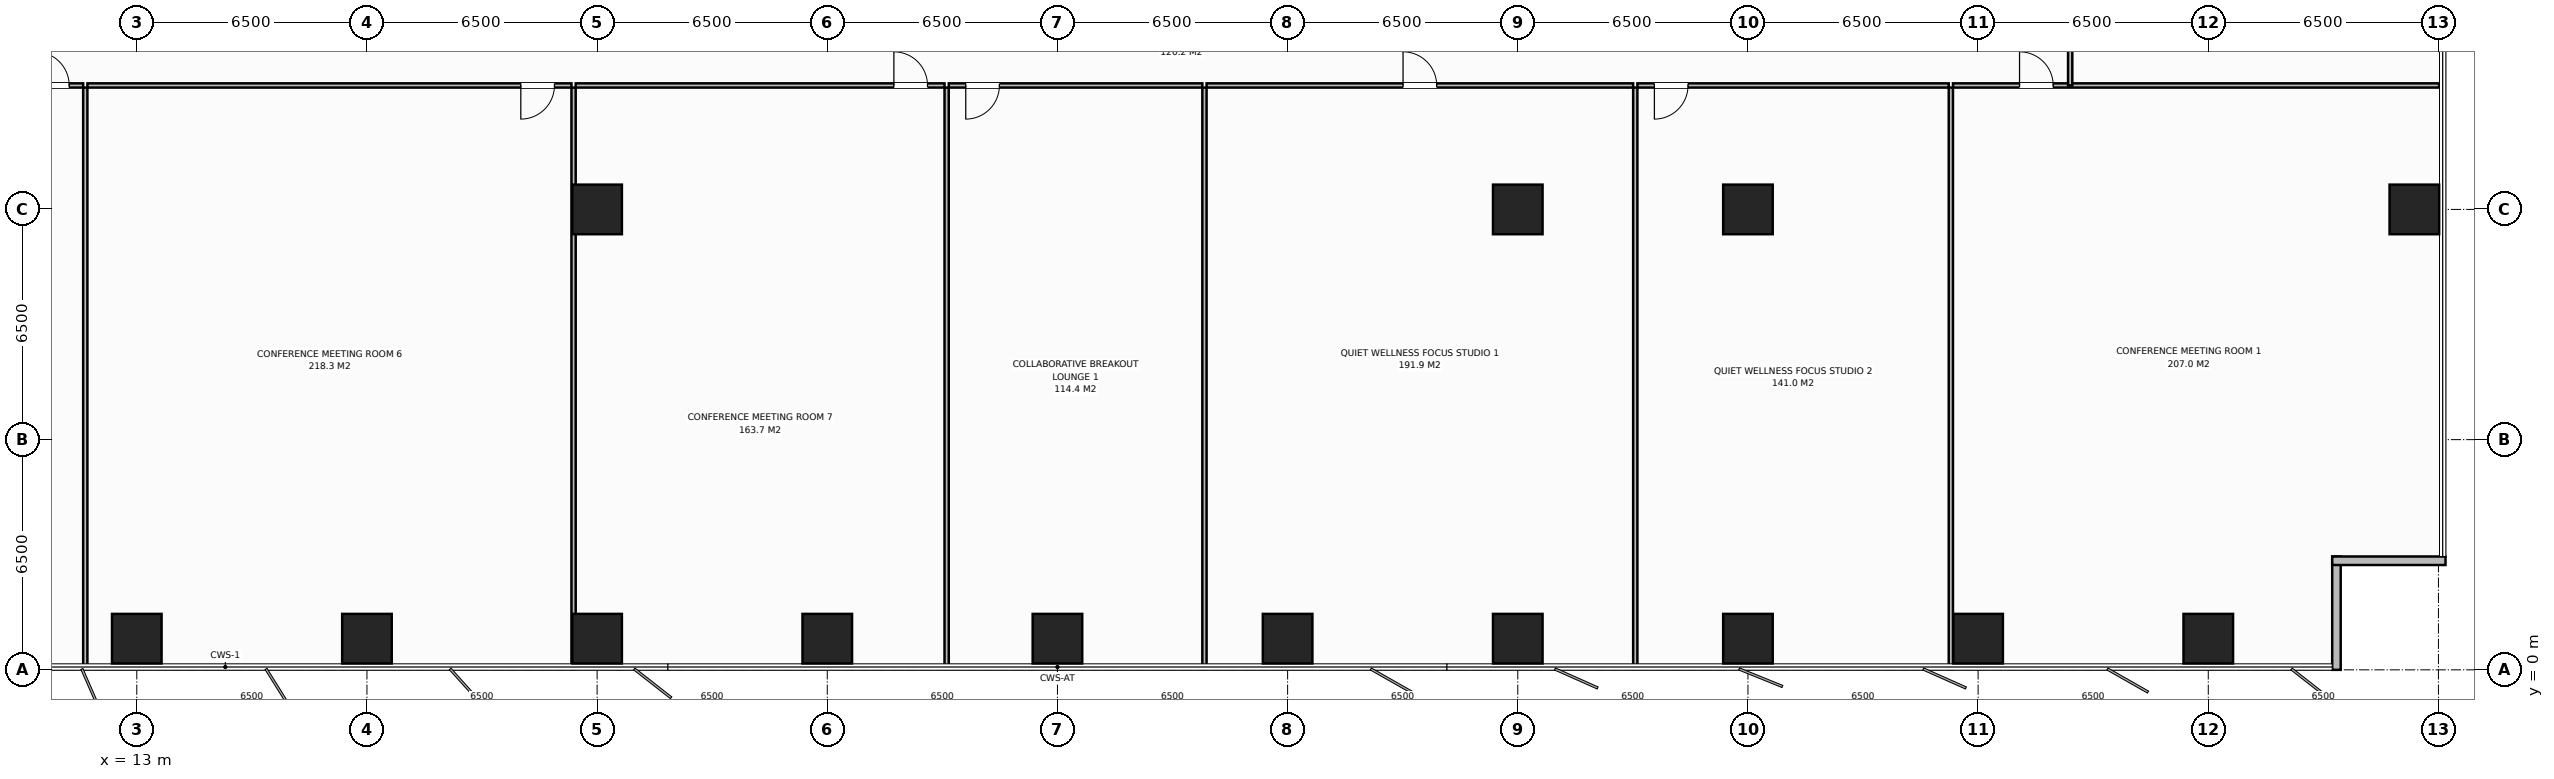
"""IFC4 building model, lengths in metres.
Left out: names, types, materials, properties, quantities, classifications, styles, units other than length and angle.
Written with IfcOpenShell. Run it as: python <this file> out.ifc"""

import sys

from ifc_helpers import new_model, si_unit, direction, frame, frame_2d, origin, origin_2d, place, context, subcontext, project, spatial, rectangle, extrude, element, fill, save


model = new_model("IFC4")
c1 = context("Model", 3, precision=1e-05, world=origin(), true_north=direction((0.0, 1.0)))
c2 = subcontext(c1, "Body", "Model", "MODEL_VIEW")
j1 = project(units=[si_unit("LENGTHUNIT", "METRE"), si_unit("PLANEANGLEUNIT", "RADIAN")], contexts=[c1])
p1 = place(None, origin())
s1 = spatial("IfcSite", under=j1, at=p1, CompositionType="ELEMENT")
p2 = place(p1, origin())
s2 = spatial("IfcBuilding", under=s1, at=p2, CompositionType="ELEMENT")
p3 = place(p2, frame((0.0, 0.0, 73.4)))
s3 = spatial("IfcBuildingStorey", under=s2, at=p3, CompositionType="ELEMENT", Elevation=73.4)
for number, where, z_axis, x_axis in (
    (1, (58.5, 13.0, 0.0), (0.0, 0.0, 1.0), (1.0, 0.0, 0.0)),
    (2, (26.0, 13.0, 0.0), (0.0, 0.0, 1.0), (1.0, 0.0, 0.0)),
    (3, (52.0, 13.0, 0.0), (0.0, 0.0, 1.0), (1.0, 0.0, 0.0)),
    (4, (13.0, 0.88, 0.0), (0.0, 0.0, 1.0), (1.0, 0.0, 0.0)),
    (5, (19.5, 0.88, 0.0), (0.0, 0.0, 1.0), (1.0, 0.0, 0.0)),
    (6, (26.0, 0.88, 0.0), (0.0, 0.0, 1.0), (1.0, 0.0, 0.0)),
    (7, (32.5, 0.88, 0.0), (0.0, 0.0, 1.0), (1.0, 0.0, 0.0)),
    (8, (39.0, 0.88, 0.0), (0.0, 0.0, 1.0), (1.0, 0.0, 0.0)),
    (9, (45.5, 0.88, 0.0), (0.0, 0.0, 1.0), (1.0, 0.0, 0.0)),
    (10, (52.0, 0.88, 0.0), (0.0, 0.0, 1.0), (1.0, 0.0, 0.0)),
    (11, (58.5, 0.88, 0.0), (0.0, 0.0, 1.0), (1.0, 0.0, 0.0)),
    (12, (65.0, 0.88, 0.0), (0.0, 0.0, 1.0), (1.0, 0.0, 0.0)),
    (13, (71.5, 0.88, 0.0), (0.0, 0.0, 1.0), (1.0, 0.0, 0.0)),
    (14, (77.32, 13.0, 0.0), (0.0, 0.0, 1.0), (1.0, 0.0, 0.0)),
):
    element("IfcColumn", number, at=place(p3, frame(where, z_axis=z_axis, x_axis=x_axis)), inside=s3, PredefinedType="COLUMN", context=c2, shape_type="SweptSolid", body=[
        extrude(rectangle(XDim=1.4, YDim=1.4, at=origin_2d()), origin(), (0.0, 0.0, 1.0), 3.8),
    ])
for number, where, z_axis, x_axis in (
    (15, (75.12, 3.2, 0.0), (0.0, 0.0, 1.0), (0.0, -1.0, 0.0)),
    (16, (78.2, 3.08, 0.0), (0.0, 0.0, 1.0), (-1.0, 0.0, 0.0)),
):
    element("IfcWall", number, at=place(p3, frame(where, z_axis=z_axis, x_axis=x_axis)), inside=s3, PredefinedType="STANDARD", context=c2, shape_type="SweptSolid", body=[
        extrude(rectangle(XDim=3.2, YDim=0.24, at=frame_2d((1.6, 0.0))), origin(), (0.0, 0.0, 1.0), 3.55),
    ])
p4 = place(p3, frame((11.545, 0.02, 0.0), z_axis=(0.0, 0.0, 1.0), x_axis=(0.0, 1.0, 0.0)))
e17 = element("IfcWall", 17, at=p4, inside=s3, PredefinedType="PARTITIONING", context=c2, shape_type="SweptSolid", body=[
    extrude(rectangle(XDim=16.42, YDim=0.12, at=frame_2d((8.21, 0.0))), origin(), (0.0, 0.0, 1.0), 3.55),
])
p5 = place(p3, frame((-0.02, 16.5, 0.0), z_axis=(0.0, 0.0, 1.0), x_axis=(1.0, 0.0, 0.0)))
e18 = element("IfcWall", 18, at=p5, inside=s3, PredefinedType="PARTITIONING", context=c2, shape_type="SweptSolid", body=[
    extrude(rectangle(XDim=11.506, YDim=0.12, at=frame_2d((5.753, 0.0))), origin(), (0.0, 0.0, 1.0), 3.55),
])
p6 = place(p5, frame((10.16, 0.0, 0.0)))
e19 = element("IfcOpeningElement", 19, at=p6, cuts=e18, PredefinedType="OPENING", context=c2, shape_type="SweptSolid", body=[
    extrude(rectangle(XDim=0.95, YDim=2.15, at=frame_2d((0.475, 1.075))), frame((0.0, 0.07, 0.0), z_axis=(0.0, -1.0, 0.0), x_axis=(1.0, 0.0, 0.0)), (0.0, 0.0, 1.0), 0.14),
])
p7 = place(p3, frame((25.335, 0.02, 0.0), z_axis=(0.0, 0.0, 1.0), x_axis=(0.0, 1.0, 0.0)))
e20 = element("IfcWall", 20, at=p7, inside=s3, PredefinedType="PARTITIONING", context=c2, shape_type="SweptSolid", body=[
    extrude(rectangle(XDim=16.42, YDim=0.12, at=frame_2d((8.21, 0.0))), origin(), (0.0, 0.0, 1.0), 3.55),
])
p8 = place(p3, frame((11.605, 16.5, 0.0), z_axis=(0.0, 0.0, 1.0), x_axis=(1.0, 0.0, 0.0)))
e21 = element("IfcWall", 21, at=p8, inside=s3, PredefinedType="PARTITIONING", context=c2, shape_type="SweptSolid", body=[
    extrude(rectangle(XDim=13.67, YDim=0.12, at=frame_2d((6.835, 0.0))), origin(), (0.0, 0.0, 1.0), 3.55),
])
p9 = place(p8, frame((12.24, 0.0, 0.0)))
e22 = element("IfcOpeningElement", 22, at=p9, cuts=e21, PredefinedType="OPENING", context=c2, shape_type="SweptSolid", body=[
    extrude(rectangle(XDim=0.95, YDim=2.15, at=frame_2d((0.475, 1.075))), frame((0.0, 0.07, 0.0), z_axis=(0.0, -1.0, 0.0), x_axis=(1.0, 0.0, 0.0)), (0.0, 0.0, 1.0), 0.14),
])
p10 = place(p3, frame((35.871, 0.02, 0.0), z_axis=(0.0, 0.0, 1.0), x_axis=(0.0, 1.0, 0.0)))
e23 = element("IfcWall", 23, at=p10, inside=s3, PredefinedType="PARTITIONING", context=c2, shape_type="SweptSolid", body=[
    extrude(rectangle(XDim=16.42, YDim=0.12, at=frame_2d((8.21, 0.0))), origin(), (0.0, 0.0, 1.0), 3.55),
])
p11 = place(p3, frame((25.395, 16.5, 0.0), z_axis=(0.0, 0.0, 1.0), x_axis=(1.0, 0.0, 0.0)))
e24 = element("IfcWall", 24, at=p11, inside=s3, PredefinedType="PARTITIONING", context=c2, shape_type="SweptSolid", body=[
    extrude(rectangle(XDim=10.415, YDim=0.12, at=frame_2d((5.208, 0.0))), origin(), (0.0, 0.0, 1.0), 3.55),
])
p12 = place(p11, frame((8.985, 0.0, 0.0)))
e25 = element("IfcOpeningElement", 25, at=p12, cuts=e24, PredefinedType="OPENING", context=c2, shape_type="SweptSolid", body=[
    extrude(rectangle(XDim=0.95, YDim=2.15, at=frame_2d((0.475, 1.075))), frame((0.0, 0.07, 0.0), z_axis=(0.0, -1.0, 0.0), x_axis=(1.0, 0.0, 0.0)), (0.0, 0.0, 1.0), 0.14),
])
p13 = place(p3, frame((43.152, 0.02, 0.0), z_axis=(0.0, 0.0, 1.0), x_axis=(0.0, 1.0, 0.0)))
e26 = element("IfcWall", 26, at=p13, inside=s3, PredefinedType="PARTITIONING", context=c2, shape_type="SweptSolid", body=[
    extrude(rectangle(XDim=16.42, YDim=0.12, at=frame_2d((8.21, 0.0))), origin(), (0.0, 0.0, 1.0), 3.55),
])
p14 = place(p3, frame((35.931, 16.5, 0.0), z_axis=(0.0, 0.0, 1.0), x_axis=(1.0, 0.0, 0.0)))
e27 = element("IfcWall", 27, at=p14, inside=s3, PredefinedType="PARTITIONING", context=c2, shape_type="SweptSolid", body=[
    extrude(rectangle(XDim=7.161, YDim=0.12, at=frame_2d((3.581, 0.0))), origin(), (0.0, 0.0, 1.0), 3.55),
])
p15 = place(p14, frame((0.48, 0.0, 0.0)))
e28 = element("IfcOpeningElement", 28, at=p15, cuts=e27, PredefinedType="OPENING", context=c2, shape_type="SweptSolid", body=[
    extrude(rectangle(XDim=0.95, YDim=2.15, at=frame_2d((0.475, 1.075))), frame((0.0, 0.07, 0.0), z_axis=(0.0, -1.0, 0.0), x_axis=(1.0, 0.0, 0.0)), (0.0, 0.0, 1.0), 0.14),
])
p16 = place(p3, frame((55.318, 0.02, 0.0), z_axis=(0.0, 0.0, 1.0), x_axis=(0.0, 1.0, 0.0)))
e29 = element("IfcWall", 29, at=p16, inside=s3, PredefinedType="PARTITIONING", context=c2, shape_type="SweptSolid", body=[
    extrude(rectangle(XDim=16.42, YDim=0.12, at=frame_2d((8.21, 0.0))), origin(), (0.0, 0.0, 1.0), 3.55),
])
p17 = place(p3, frame((43.212, 16.5, 0.0), z_axis=(0.0, 0.0, 1.0), x_axis=(1.0, 0.0, 0.0)))
e30 = element("IfcWall", 30, at=p17, inside=s3, PredefinedType="PARTITIONING", context=c2, shape_type="SweptSolid", body=[
    extrude(rectangle(XDim=12.047, YDim=0.12, at=frame_2d((6.023, 0.0))), origin(), (0.0, 0.0, 1.0), 3.55),
])
p18 = place(p17, frame((5.548, 0.0, 0.0)))
e31 = element("IfcOpeningElement", 31, at=p18, cuts=e30, PredefinedType="OPENING", context=c2, shape_type="SweptSolid", body=[
    extrude(rectangle(XDim=0.95, YDim=2.15, at=frame_2d((0.475, 1.075))), frame((0.0, 0.07, 0.0), z_axis=(0.0, -1.0, 0.0), x_axis=(1.0, 0.0, 0.0)), (0.0, 0.0, 1.0), 0.14),
])
p19 = place(p3, frame((64.23, 0.02, 0.0), z_axis=(0.0, 0.0, 1.0), x_axis=(0.0, 1.0, 0.0)))
e32 = element("IfcWall", 32, at=p19, inside=s3, PredefinedType="PARTITIONING", context=c2, shape_type="SweptSolid", body=[
    extrude(rectangle(XDim=16.42, YDim=0.12, at=frame_2d((8.21, 0.0))), origin(), (0.0, 0.0, 1.0), 3.55),
])
p20 = place(p3, frame((55.378, 16.5, 0.0), z_axis=(0.0, 0.0, 1.0), x_axis=(1.0, 0.0, 0.0)))
e33 = element("IfcWall", 33, at=p20, inside=s3, PredefinedType="PARTITIONING", context=c2, shape_type="SweptSolid", body=[
    extrude(rectangle(XDim=8.792, YDim=0.12, at=frame_2d((4.396, 0.0))), origin(), (0.0, 0.0, 1.0), 3.55),
])
p21 = place(p20, frame((0.48, 0.0, 0.0)))
e34 = element("IfcOpeningElement", 34, at=p21, cuts=e33, PredefinedType="OPENING", context=c2, shape_type="SweptSolid", body=[
    extrude(rectangle(XDim=0.95, YDim=2.15, at=frame_2d((0.475, 1.075))), frame((0.0, 0.07, 0.0), z_axis=(0.0, -1.0, 0.0), x_axis=(1.0, 0.0, 0.0)), (0.0, 0.0, 1.0), 0.14),
])
p22 = place(p3, frame((64.29, 16.5, 0.0), z_axis=(0.0, 0.0, 1.0), x_axis=(1.0, 0.0, 0.0)))
e35 = element("IfcWall", 35, at=p22, inside=s3, PredefinedType="PARTITIONING", context=c2, shape_type="SweptSolid", body=[
    extrude(rectangle(XDim=13.73, YDim=0.12, at=frame_2d((6.865, 0.0))), origin(), (0.0, 0.0, 1.0), 3.55),
])
p23 = place(p22, frame((1.88, 0.0, 0.0)))
e36 = element("IfcOpeningElement", 36, at=p23, cuts=e35, PredefinedType="OPENING", context=c2, shape_type="SweptSolid", body=[
    extrude(rectangle(XDim=0.95, YDim=2.15, at=frame_2d((0.475, 1.075))), frame((0.0, 0.07, 0.0), z_axis=(0.0, -1.0, 0.0), x_axis=(1.0, 0.0, 0.0)), (0.0, 0.0, 1.0), 0.14),
])
p24 = place(p3, frame((67.6, 16.5, 0.0), z_axis=(0.0, 0.0, 1.0), x_axis=(0.0, 1.0, 0.0)))
e37 = element("IfcWall", 37, at=p24, inside=s3, PredefinedType="PARTITIONING", context=c2, shape_type="SweptSolid", body=[
    extrude(rectangle(XDim=16.9, YDim=0.12, at=frame_2d((8.45, 0.0))), origin(), (0.0, 0.0, 1.0), 3.55),
])
p25 = place(p24, frame((9.025, 0.0, 0.0)))
e38 = element("IfcOpeningElement", 38, at=p25, cuts=e37, PredefinedType="OPENING", context=c2, shape_type="SweptSolid", body=[
    extrude(rectangle(XDim=0.95, YDim=2.15, at=frame_2d((0.475, 1.075))), frame((0.0, 0.07, 0.0), z_axis=(0.0, -1.0, 0.0), x_axis=(1.0, 0.0, 0.0)), (0.0, 0.0, 1.0), 0.14),
])
p26 = place(p6, origin())
e39 = element("IfcDoor", 39, at=p26, inside=s3, OperationType="SINGLE_SWING_LEFT", PredefinedType="DOOR", context=c2, shape_type="SweptSolid", body=[
    extrude(rectangle(XDim=0.95, YDim=2.15, at=frame_2d((0.475, 1.075))), frame((0.0, 0.025, 0.0), z_axis=(0.0, -1.0, 0.0), x_axis=(1.0, 0.0, 0.0)), (0.0, 0.0, 1.0), 0.05),
])
fill(e19, e39)
p27 = place(p9, origin())
e40 = element("IfcDoor", 40, at=p27, inside=s3, OperationType="SINGLE_SWING_RIGHT", PredefinedType="DOOR", context=c2, shape_type="SweptSolid", body=[
    extrude(rectangle(XDim=0.95, YDim=2.15, at=frame_2d((0.475, 1.075))), frame((0.0, 0.025, 0.0), z_axis=(0.0, -1.0, 0.0), x_axis=(1.0, 0.0, 0.0)), (0.0, 0.0, 1.0), 0.05),
])
fill(e22, e40)
p28 = place(p12, origin())
e41 = element("IfcDoor", 41, at=p28, inside=s3, OperationType="SINGLE_SWING_LEFT", PredefinedType="DOOR", context=c2, shape_type="SweptSolid", body=[
    extrude(rectangle(XDim=0.95, YDim=2.15, at=frame_2d((0.475, 1.075))), frame((0.0, 0.025, 0.0), z_axis=(0.0, -1.0, 0.0), x_axis=(1.0, 0.0, 0.0)), (0.0, 0.0, 1.0), 0.05),
])
fill(e25, e41)
p29 = place(p15, origin())
e42 = element("IfcDoor", 42, at=p29, inside=s3, OperationType="SINGLE_SWING_RIGHT", PredefinedType="DOOR", context=c2, shape_type="SweptSolid", body=[
    extrude(rectangle(XDim=0.95, YDim=2.15, at=frame_2d((0.475, 1.075))), frame((0.0, 0.025, 0.0), z_axis=(0.0, -1.0, 0.0), x_axis=(1.0, 0.0, 0.0)), (0.0, 0.0, 1.0), 0.05),
])
fill(e28, e42)
p30 = place(p18, origin())
e43 = element("IfcDoor", 43, at=p30, inside=s3, OperationType="SINGLE_SWING_LEFT", PredefinedType="DOOR", context=c2, shape_type="SweptSolid", body=[
    extrude(rectangle(XDim=0.95, YDim=2.15, at=frame_2d((0.475, 1.075))), frame((0.0, 0.025, 0.0), z_axis=(0.0, -1.0, 0.0), x_axis=(1.0, 0.0, 0.0)), (0.0, 0.0, 1.0), 0.05),
])
fill(e31, e43)
p31 = place(p21, origin())
e44 = element("IfcDoor", 44, at=p31, inside=s3, OperationType="SINGLE_SWING_RIGHT", PredefinedType="DOOR", context=c2, shape_type="SweptSolid", body=[
    extrude(rectangle(XDim=0.95, YDim=2.15, at=frame_2d((0.475, 1.075))), frame((0.0, 0.025, 0.0), z_axis=(0.0, -1.0, 0.0), x_axis=(1.0, 0.0, 0.0)), (0.0, 0.0, 1.0), 0.05),
])
fill(e34, e44)
p32 = place(p23, origin())
e45 = element("IfcDoor", 45, at=p32, inside=s3, OperationType="SINGLE_SWING_LEFT", PredefinedType="DOOR", context=c2, shape_type="SweptSolid", body=[
    extrude(rectangle(XDim=0.95, YDim=2.15, at=frame_2d((0.475, 1.075))), frame((0.0, 0.025, 0.0), z_axis=(0.0, -1.0, 0.0), x_axis=(1.0, 0.0, 0.0)), (0.0, 0.0, 1.0), 0.05),
])
fill(e36, e45)
save(model, sys.argv[1])
